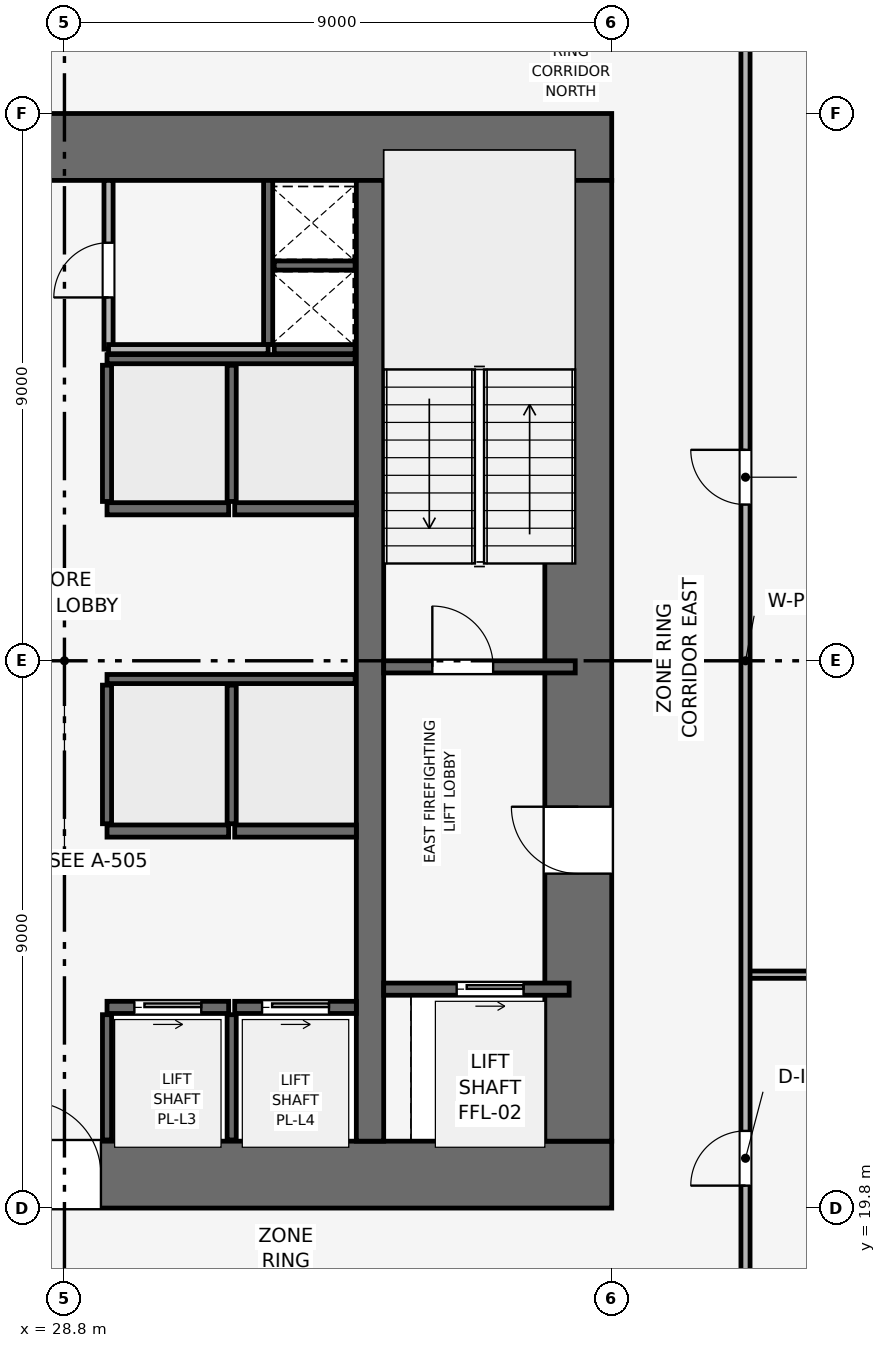
"""IFC4 building model, lengths in metres.
Left out: names, types, materials, properties, quantities, classifications, styles, units other than length and angle.
Written with IfcOpenShell. Run it as: python <this file> out.ifc"""

import sys

from ifc_helpers import new_model, si_unit, direction, frame, frame_2d, origin, place, context, subcontext, project, spatial, rectangle, extrude, element, fill, save


model = new_model("IFC4")
c1 = context("Model", 3, precision=1e-05, world=origin(), true_north=direction((0.0, 1.0)))
c2 = subcontext(c1, "Body", "Model", "MODEL_VIEW")
j1 = project(units=[si_unit("LENGTHUNIT", "METRE"), si_unit("PLANEANGLEUNIT", "RADIAN")], contexts=[c1])
p1 = place(None, origin())
s1 = spatial("IfcSite", under=j1, at=p1, CompositionType="ELEMENT")
p2 = place(p1, origin())
s2 = spatial("IfcBuilding", under=s1, at=p2, CompositionType="ELEMENT")
p3 = place(p2, frame((0.0, 0.0, 96.3)))
s3 = spatial("IfcBuildingStorey", under=s2, at=p3, CompositionType="ELEMENT", Elevation=96.3)
p4 = place(p3, frame((19.8, 20.35, 0.0), z_axis=(0.0, 0.0, 1.0), x_axis=(1.0, 0.0, 0.0)))
e1 = element("IfcWall", 1, at=p4, inside=s3, PredefinedType="SHEAR", context=c2, shape_type="SweptSolid", body=[
    extrude(rectangle(XDim=18.0, YDim=1.1, at=frame_2d((9.0, 0.0))), origin(), (0.0, 0.0, 1.0), 3.9),
])
p5 = place(p4, frame((8.4, 0.0, 0.0)))
e2 = element("IfcOpeningElement", 2, at=p5, cuts=e1, PredefinedType="OPENING", context=c2, shape_type="SweptSolid", body=[
    extrude(rectangle(XDim=1.2, YDim=2.2, at=frame_2d((0.6, 1.1))), frame((0.0, 0.56, 0.0), z_axis=(0.0, -1.0, 0.0), x_axis=(1.0, 0.0, 0.0)), (0.0, 0.0, 1.0), 1.12),
])
p6 = place(p3, frame((19.8, 37.25, 0.0), z_axis=(0.0, 0.0, 1.0), x_axis=(1.0, 0.0, 0.0)))
e3 = element("IfcWall", 3, at=p6, inside=s3, PredefinedType="SHEAR", context=c2, shape_type="SweptSolid", body=[
    extrude(rectangle(XDim=18.0, YDim=1.1, at=frame_2d((9.0, 0.0))), origin(), (0.0, 0.0, 1.0), 3.9),
])
p7 = place(p6, frame((7.05, 0.0, 0.0)))
e4 = element("IfcOpeningElement", 4, at=p7, cuts=e3, PredefinedType="OPENING", context=c2, shape_type="SweptSolid", body=[
    extrude(rectangle(XDim=1.1, YDim=2.15, at=frame_2d((0.55, 1.075))), frame((0.0, 0.56, 0.0), z_axis=(0.0, -1.0, 0.0), x_axis=(1.0, 0.0, 0.0)), (0.0, 0.0, 1.0), 1.12),
])
p8 = place(p3, frame((37.25, 20.9, 0.0), z_axis=(0.0, 0.0, 1.0), x_axis=(0.0, 1.0, 0.0)))
e5 = element("IfcWall", 5, at=p8, inside=s3, PredefinedType="SHEAR", context=c2, shape_type="SweptSolid", body=[
    extrude(rectangle(XDim=15.8, YDim=1.1, at=frame_2d((7.9, 0.0))), origin(), (0.0, 0.0, 1.0), 3.9),
])
p9 = place(p8, frame((4.4, 0.0, 0.0)))
e6 = element("IfcOpeningElement", 6, at=p9, cuts=e5, PredefinedType="OPENING", context=c2, shape_type="SweptSolid", body=[
    extrude(rectangle(XDim=1.1, YDim=2.15, at=frame_2d((0.55, 1.075))), frame((0.0, 0.56, 0.0), z_axis=(0.0, -1.0, 0.0), x_axis=(1.0, 0.0, 0.0)), (0.0, 0.0, 1.0), 1.12),
])
p10 = place(p3, frame((33.825, 20.9, 0.0), z_axis=(0.0, 0.0, 1.0), x_axis=(0.0, 1.0, 0.0)))
e7 = element("IfcWall", 7, at=p10, inside=s3, PredefinedType="SHEAR", context=c2, shape_type="SweptSolid", body=[
    extrude(rectangle(XDim=15.8, YDim=0.45, at=frame_2d((7.9, 0.0))), origin(), (0.0, 0.0, 1.0), 3.9),
])
p11 = place(p3, frame((34.05, 28.7, 0.0), z_axis=(0.0, 0.0, 1.0), x_axis=(1.0, 0.0, 0.0)))
e8 = element("IfcWall", 8, at=p11, inside=s3, PredefinedType="SHEAR", context=c2, shape_type="SweptSolid", body=[
    extrude(rectangle(XDim=3.15, YDim=0.2, at=frame_2d((1.575, 0.0))), origin(), (0.0, 0.0, 1.0), 3.65),
])
p12 = place(p11, frame((0.8, 0.0, 0.0)))
e9 = element("IfcOpeningElement", 9, at=p12, cuts=e8, PredefinedType="OPENING", context=c2, shape_type="SweptSolid", body=[
    extrude(rectangle(XDim=1.0, YDim=2.1, at=frame_2d((0.5, 1.05))), frame((0.0, 0.11, 0.0), z_axis=(0.0, -1.0, 0.0), x_axis=(1.0, 0.0, 0.0)), (0.0, 0.0, 1.0), 0.22),
])
p13 = place(p3, frame((32.15, 34.0, 0.0), z_axis=(0.0, 0.0, 1.0), x_axis=(0.0, 1.0, 0.0)))
e10 = element("IfcWall", 10, at=p13, inside=s3, PredefinedType="SHEAR", context=c2, shape_type="SweptSolid", body=[
    extrude(rectangle(XDim=2.7, YDim=0.15, at=frame_2d((1.35, 0.0))), origin(), (0.0, 0.0, 1.0), 3.65),
])
for number, where, z_axis, x_axis in (
    (11, (32.25, 33.925, 0.0), (0.0, 0.0, 1.0), (1.0, 0.0, 0.0)),
    (12, (32.25, 35.3, 0.0), (0.0, 0.0, 1.0), (1.0, 0.0, 0.0)),
):
    element("IfcWall", number, at=place(p3, frame(where, z_axis=z_axis, x_axis=x_axis)), inside=s3, PredefinedType="SHEAR", context=c2, shape_type="SweptSolid", body=[
        extrude(rectangle(XDim=1.33, YDim=0.15, at=frame_2d((0.665, 0.0))), origin(), (0.0, 0.0, 1.0), 3.65),
    ])
p14 = place(p3, frame((34.05, 23.4, 0.0), z_axis=(0.0, 0.0, 1.0), x_axis=(1.0, 0.0, 0.0)))
e13 = element("IfcWall", 13, at=p14, inside=s3, PredefinedType="SHEAR", context=c2, shape_type="SweptSolid", body=[
    extrude(rectangle(XDim=3.05, YDim=0.2, at=frame_2d((1.525, 0.0))), origin(), (0.0, 0.0, 1.0), 3.65),
])
p15 = place(p14, frame((1.2, 0.0, 0.0)))
e14 = element("IfcOpeningElement", 14, at=p15, cuts=e13, PredefinedType="OPENING", context=c2, shape_type="SweptSolid", body=[
    extrude(rectangle(XDim=1.1, YDim=2.15, at=frame_2d((0.55, 1.075))), frame((0.0, 0.11, 0.0), z_axis=(0.0, -1.0, 0.0), x_axis=(1.0, 0.0, 0.0)), (0.0, 0.0, 1.0), 0.22),
])
p16 = place(p3, frame((29.5, 23.1, 0.0), z_axis=(0.0, 0.0, 1.0), x_axis=(1.0, 0.0, 0.0)))
e15 = element("IfcWall", 15, at=p16, inside=s3, PredefinedType="SHEAR", context=c2, shape_type="SweptSolid", body=[
    extrude(rectangle(XDim=2.0, YDim=0.2, at=frame_2d((1.0, 0.0))), origin(), (0.0, 0.0, 1.0), 3.65),
])
p17 = place(p16, frame((0.45, 0.0, 0.0)))
e16 = element("IfcOpeningElement", 16, at=p17, cuts=e15, PredefinedType="OPENING", context=c2, shape_type="SweptSolid", body=[
    extrude(rectangle(XDim=1.1, YDim=2.15, at=frame_2d((0.55, 1.075))), frame((0.0, 0.11, 0.0), z_axis=(0.0, -1.0, 0.0), x_axis=(1.0, 0.0, 0.0)), (0.0, 0.0, 1.0), 0.22),
])
p18 = place(p3, frame((31.6, 23.1, 0.0), z_axis=(0.0, 0.0, 1.0), x_axis=(1.0, 0.0, 0.0)))
e17 = element("IfcWall", 17, at=p18, inside=s3, PredefinedType="SHEAR", context=c2, shape_type="SweptSolid", body=[
    extrude(rectangle(XDim=2.0, YDim=0.2, at=frame_2d((1.0, 0.0))), origin(), (0.0, 0.0, 1.0), 3.65),
])
p19 = place(p18, frame((0.45, 0.0, 0.0)))
e18 = element("IfcOpeningElement", 18, at=p19, cuts=e17, PredefinedType="OPENING", context=c2, shape_type="SweptSolid", body=[
    extrude(rectangle(XDim=1.1, YDim=2.15, at=frame_2d((0.55, 1.075))), frame((0.0, 0.11, 0.0), z_axis=(0.0, -1.0, 0.0), x_axis=(1.0, 0.0, 0.0)), (0.0, 0.0, 1.0), 0.22),
])
for number, where, z_axis, x_axis in (
    (19, (29.5, 26.0, 0.0), (0.0, 0.0, 1.0), (1.0, 0.0, 0.0)),
    (20, (31.6, 26.0, 0.0), (0.0, 0.0, 1.0), (1.0, 0.0, 0.0)),
    (21, (29.5, 31.3, 0.0), (0.0, 0.0, 1.0), (1.0, 0.0, 0.0)),
    (22, (31.6, 31.3, 0.0), (0.0, 0.0, 1.0), (1.0, 0.0, 0.0)),
):
    element("IfcWall", number, at=place(p3, frame(where, z_axis=z_axis, x_axis=x_axis)), inside=s3, PredefinedType="SHEAR", context=c2, shape_type="SweptSolid", body=[
        extrude(rectangle(XDim=2.0, YDim=0.2, at=frame_2d((1.0, 0.0))), origin(), (0.0, 0.0, 1.0), 3.65),
    ])
for number, where, z_axis, x_axis in (
    (23, (29.5, 20.92, 0.0), (0.0, 0.0, 1.0), (0.0, 1.0, 0.0)),
    (24, (31.55, 20.92, 0.0), (0.0, 0.0, 1.0), (0.0, 1.0, 0.0)),
):
    element("IfcWall", number, at=place(p3, frame(where, z_axis=z_axis, x_axis=x_axis)), inside=s3, PredefinedType="SHEAR", context=c2, shape_type="SweptSolid", body=[
        extrude(rectangle(XDim=2.06, YDim=0.15, at=frame_2d((1.03, 0.0))), origin(), (0.0, 0.0, 1.0), 3.65),
    ])
p20 = place(p3, frame((29.5, 28.5, 0.0), z_axis=(0.0, 0.0, 1.0), x_axis=(1.0, 0.0, 0.0)))
e25 = element("IfcWall", 25, at=p20, inside=s3, PredefinedType="SHEAR", context=c2, shape_type="SweptSolid", body=[
    extrude(rectangle(XDim=4.08, YDim=0.15, at=frame_2d((2.04, 0.0))), origin(), (0.0, 0.0, 1.0), 3.65),
])
for number, where, z_axis, x_axis in (
    (26, (29.5, 26.12, 0.0), (0.0, 0.0, 1.0), (0.0, 1.0, 0.0)),
    (27, (31.55, 26.12, 0.0), (0.0, 0.0, 1.0), (0.0, 1.0, 0.0)),
):
    element("IfcWall", number, at=place(p3, frame(where, z_axis=z_axis, x_axis=x_axis)), inside=s3, PredefinedType="SHEAR", context=c2, shape_type="SweptSolid", body=[
        extrude(rectangle(XDim=2.28, YDim=0.15, at=frame_2d((1.14, 0.0))), origin(), (0.0, 0.0, 1.0), 3.65),
    ])
p21 = place(p3, frame((29.5, 33.76, 0.0), z_axis=(0.0, 0.0, 1.0), x_axis=(1.0, 0.0, 0.0)))
e28 = element("IfcWall", 28, at=p21, inside=s3, PredefinedType="SHEAR", context=c2, shape_type="SweptSolid", body=[
    extrude(rectangle(XDim=4.08, YDim=0.15, at=frame_2d((2.04, 0.0))), origin(), (0.0, 0.0, 1.0), 3.65),
])
for number, where, z_axis, x_axis in (
    (29, (29.5, 31.42, 0.0), (0.0, 0.0, 1.0), (0.0, 1.0, 0.0)),
    (30, (31.55, 31.42, 0.0), (0.0, 0.0, 1.0), (0.0, 1.0, 0.0)),
):
    element("IfcWall", number, at=place(p3, frame(where, z_axis=z_axis, x_axis=x_axis)), inside=s3, PredefinedType="SHEAR", context=c2, shape_type="SweptSolid", body=[
        extrude(rectangle(XDim=2.24, YDim=0.15, at=frame_2d((1.12, 0.0))), origin(), (0.0, 0.0, 1.0), 3.65),
    ])
p22 = place(p3, frame((29.525, 33.925, 0.0), z_axis=(0.0, 0.0, 1.0), x_axis=(0.0, 1.0, 0.0)))
e31 = element("IfcWall", 31, at=p22, inside=s3, PredefinedType="PARTITIONING", context=c2, shape_type="SweptSolid", body=[
    extrude(rectangle(XDim=2.775, YDim=0.15, at=frame_2d((1.387, 0.0))), origin(), (0.0, 0.0, 1.0), 3.65),
])
p23 = place(p22, frame((0.85, 0.0, 0.0)))
e32 = element("IfcOpeningElement", 32, at=p23, cuts=e31, PredefinedType="OPENING", context=c2, shape_type="SweptSolid", body=[
    extrude(rectangle(XDim=0.9, YDim=2.1, at=frame_2d((0.45, 1.05))), frame((0.0, 0.085, 0.0), z_axis=(0.0, -1.0, 0.0), x_axis=(1.0, 0.0, 0.0)), (0.0, 0.0, 1.0), 0.17),
])
p24 = place(p3, frame((29.525, 33.925, 0.0), z_axis=(0.0, 0.0, 1.0), x_axis=(1.0, 0.0, 0.0)))
e33 = element("IfcWall", 33, at=p24, inside=s3, PredefinedType="PARTITIONING", context=c2, shape_type="SweptSolid", body=[
    extrude(rectangle(XDim=2.625, YDim=0.15, at=frame_2d((1.312, 0.0))), origin(), (0.0, 0.0, 1.0), 3.65),
])
p25 = place(p3, frame((40.0, 23.638, 0.0), z_axis=(0.0, 0.0, 1.0), x_axis=(1.0, 0.0, 0.0)))
e34 = element("IfcWall", 34, at=p25, inside=s3, PredefinedType="PARTITIONING", context=c2, shape_type="SweptSolid", body=[
    extrude(rectangle(XDim=16.57, YDim=0.12, at=frame_2d((8.285, 0.0))), origin(), (0.0, 0.0, 1.0), 2.935),
])
p26 = place(p3, frame((40.0, 17.6, 0.0), z_axis=(0.0, 0.0, 1.0), x_axis=(0.0, 1.0, 0.0)))
e35 = element("IfcWall", 35, at=p26, inside=s3, PredefinedType="PARTITIONING", context=c2, shape_type="SweptSolid", body=[
    extrude(rectangle(XDim=22.4, YDim=0.15, at=frame_2d((11.2, 0.0))), origin(), (0.0, 0.0, 1.0), 3.085),
])
p27 = place(p26, frame((2.569, 0.0, 0.0)))
e36 = element("IfcOpeningElement", 36, at=p27, cuts=e35, PredefinedType="OPENING", context=c2, shape_type="SweptSolid", body=[
    extrude(rectangle(XDim=0.9, YDim=2.1, at=frame_2d((0.45, 1.05))), frame((0.0, 0.085, 0.0), z_axis=(0.0, -1.0, 0.0), x_axis=(1.0, 0.0, 0.0)), (0.0, 0.0, 1.0), 0.17),
])
p28 = place(p26, frame((13.769, 0.0, 0.0)))
e37 = element("IfcOpeningElement", 37, at=p28, cuts=e35, PredefinedType="OPENING", context=c2, shape_type="SweptSolid", body=[
    extrude(rectangle(XDim=0.9, YDim=2.1, at=frame_2d((0.45, 1.05))), frame((0.0, 0.085, 0.0), z_axis=(0.0, -1.0, 0.0), x_axis=(1.0, 0.0, 0.0)), (0.0, 0.0, 1.0), 0.17),
])
p29 = place(p12, origin())
e38 = element("IfcDoor", 38, at=p29, inside=s3, OperationType="SINGLE_SWING_LEFT", PredefinedType="DOOR", context=c2, shape_type="SweptSolid", body=[
    extrude(rectangle(XDim=1.0, YDim=2.1, at=frame_2d((0.5, 1.05))), frame((0.0, 0.025, 0.0), z_axis=(0.0, -1.0, 0.0), x_axis=(1.0, 0.0, 0.0)), (0.0, 0.0, 1.0), 0.05),
])
fill(e9, e38)
p30 = place(p15, origin())
e39 = element("IfcDoor", 39, at=p30, inside=s3, OperationType="SLIDING_TO_RIGHT", PredefinedType="DOOR", context=c2, shape_type="SweptSolid", body=[
    extrude(rectangle(XDim=1.1, YDim=2.15, at=frame_2d((0.55, 1.075))), frame((0.0, 0.025, 0.0), z_axis=(0.0, -1.0, 0.0), x_axis=(1.0, 0.0, 0.0)), (0.0, 0.0, 1.0), 0.05),
])
fill(e14, e39)
p31 = place(p17, origin())
e40 = element("IfcDoor", 40, at=p31, inside=s3, OperationType="SLIDING_TO_RIGHT", PredefinedType="DOOR", context=c2, shape_type="SweptSolid", body=[
    extrude(rectangle(XDim=1.1, YDim=2.15, at=frame_2d((0.55, 1.075))), frame((0.0, 0.025, 0.0), z_axis=(0.0, -1.0, 0.0), x_axis=(1.0, 0.0, 0.0)), (0.0, 0.0, 1.0), 0.05),
])
fill(e16, e40)
p32 = place(p19, origin())
e41 = element("IfcDoor", 41, at=p32, inside=s3, OperationType="SLIDING_TO_RIGHT", PredefinedType="DOOR", context=c2, shape_type="SweptSolid", body=[
    extrude(rectangle(XDim=1.1, YDim=2.15, at=frame_2d((0.55, 1.075))), frame((0.0, 0.025, 0.0), z_axis=(0.0, -1.0, 0.0), x_axis=(1.0, 0.0, 0.0)), (0.0, 0.0, 1.0), 0.05),
])
fill(e18, e41)
p33 = place(p23, origin())
e42 = element("IfcDoor", 42, at=p33, inside=s3, OperationType="SINGLE_SWING_LEFT", PredefinedType="DOOR", context=c2, shape_type="SweptSolid", body=[
    extrude(rectangle(XDim=0.9, YDim=2.1, at=frame_2d((0.45, 1.05))), frame((0.0, 0.025, 0.0), z_axis=(0.0, -1.0, 0.0), x_axis=(1.0, 0.0, 0.0)), (0.0, 0.0, 1.0), 0.05),
])
fill(e32, e42)
p34 = place(p27, origin())
e43 = element("IfcDoor", 43, at=p34, inside=s3, OperationType="SINGLE_SWING_LEFT", PredefinedType="DOOR", context=c2, shape_type="SweptSolid", body=[
    extrude(rectangle(XDim=0.9, YDim=2.1, at=frame_2d((0.45, 1.05))), frame((0.0, 0.025, 0.0), z_axis=(0.0, -1.0, 0.0), x_axis=(1.0, 0.0, 0.0)), (0.0, 0.0, 1.0), 0.05),
])
fill(e36, e43)
p35 = place(p28, origin())
e44 = element("IfcDoor", 44, at=p35, inside=s3, OperationType="SINGLE_SWING_RIGHT", PredefinedType="DOOR", context=c2, shape_type="SweptSolid", body=[
    extrude(rectangle(XDim=0.9, YDim=2.1, at=frame_2d((0.45, 1.05))), frame((0.0, 0.025, 0.0), z_axis=(0.0, -1.0, 0.0), x_axis=(1.0, 0.0, 0.0)), (0.0, 0.0, 1.0), 0.05),
])
fill(e37, e44)
p36 = place(p9, origin())
e45 = element("IfcDoor", 45, at=p36, inside=s3, OperationType="SINGLE_SWING_RIGHT", PredefinedType="DOOR", context=c2, shape_type="SweptSolid", body=[
    extrude(rectangle(XDim=1.1, YDim=2.15, at=frame_2d((0.55, 1.075))), frame((0.0, 0.025, 0.0), z_axis=(0.0, -1.0, 0.0), x_axis=(1.0, 0.0, 0.0)), (0.0, 0.0, 1.0), 0.05),
])
fill(e6, e45)
p37 = place(p5, origin())
e46 = element("IfcDoor", 46, at=p37, inside=s3, OperationType="SINGLE_SWING_LEFT", PredefinedType="DOOR", context=c2, shape_type="SweptSolid", body=[
    extrude(rectangle(XDim=1.2, YDim=2.2, at=frame_2d((0.6, 1.1))), frame((0.0, 0.025, 0.0), z_axis=(0.0, -1.0, 0.0), x_axis=(1.0, 0.0, 0.0)), (0.0, 0.0, 1.0), 0.05),
])
fill(e2, e46)
save(model, sys.argv[1])
